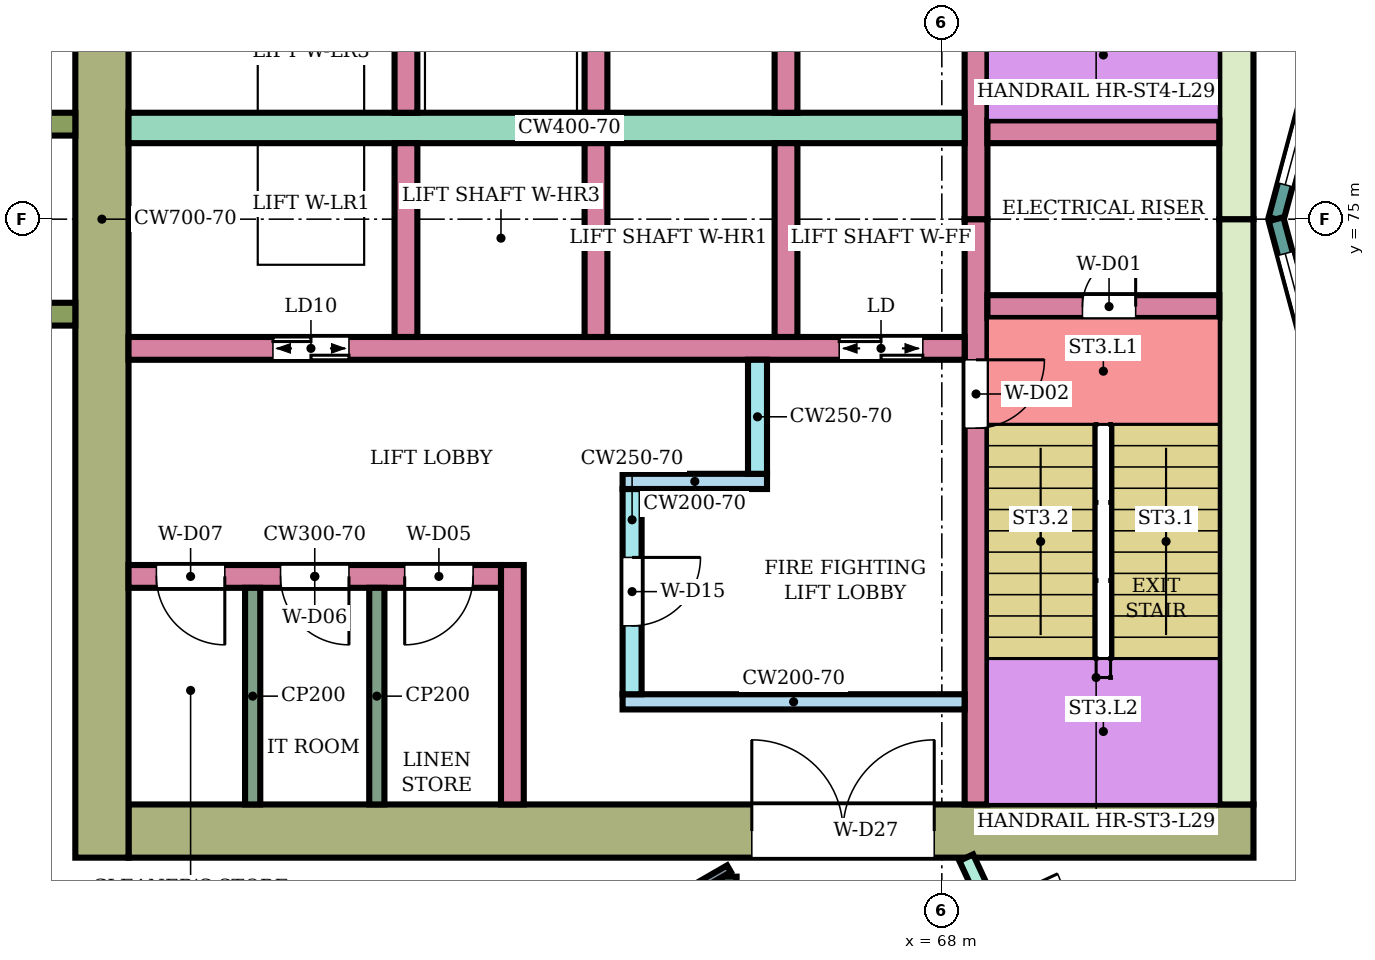
"""IFC4 building model, lengths in metres.
Left out: names, types, materials, properties, quantities, classifications, styles, units other than length and angle.
Written with IfcOpenShell. Run it as: python <this file> out.ifc"""

import sys

from ifc_helpers import new_model, si_unit, direction, frame, frame_2d, origin, place, context, subcontext, project, spatial, rectangle, extrude, element, fill, save


model = new_model("IFC4")
c1 = context("Model", 3, precision=1e-05, world=origin(), true_north=direction((0.0, 1.0)))
c2 = subcontext(c1, "Body", "Model", "MODEL_VIEW")
j1 = project(units=[si_unit("LENGTHUNIT", "METRE"), si_unit("PLANEANGLEUNIT", "RADIAN")], contexts=[c1])
p1 = place(None, origin())
s1 = spatial("IfcSite", under=j1, at=p1, CompositionType="ELEMENT")
p2 = place(p1, origin())
s2 = spatial("IfcBuilding", under=s1, at=p2, CompositionType="ELEMENT")
p3 = place(p2, frame((0.0, 0.0, 126.3)))
s3 = spatial("IfcBuildingStorey", under=s2, at=p3, CompositionType="ELEMENT", Elevation=126.3)
p4 = place(p3, frame((72.1, 66.95, 0.0), z_axis=(0.0, 0.0, 1.0), x_axis=(-1.0, 0.0, 0.0)))
e1 = element("IfcWall", 1, at=p4, inside=s3, PredefinedType="SHEAR", context=c2, shape_type="SweptSolid", body=[
    extrude(rectangle(XDim=14.8, YDim=0.7, at=frame_2d((7.4, 0.0))), origin(), (0.0, 0.0, 1.0), 3.58),
])
p5 = place(p4, frame((4.2, 0.0, 0.0)))
e2 = element("IfcOpeningElement", 2, at=p5, cuts=e1, PredefinedType="OPENING", context=c2, shape_type="SweptSolid", body=[
    extrude(rectangle(XDim=2.4, YDim=2.4, at=frame_2d((1.2, 1.2))), frame((0.0, 0.36, 0.0), z_axis=(0.0, -1.0, 0.0), x_axis=(1.0, 0.0, 0.0)), (0.0, 0.0, 1.0), 0.72),
])
for number, where, z_axis, x_axis in (
    (3, (71.875, 75.0, 0.0), (0.0, 0.0, 1.0), (0.0, -1.0, 0.0)),
    (4, (71.875, 82.7, 0.0), (0.0, 0.0, 1.0), (0.0, -1.0, 0.0)),
):
    element("IfcWall", number, at=place(p3, frame(where, z_axis=z_axis, x_axis=x_axis)), inside=s3, PredefinedType="SHEAR", context=c2, shape_type="SweptSolid", body=[
        extrude(rectangle(XDim=7.7, YDim=0.45, at=frame_2d((3.85, 0.0))), origin(), (0.0, 0.0, 1.0), 3.58),
    ])
p6 = place(p3, frame((56.95, 83.4, 0.0), z_axis=(0.0, 0.0, 1.0), x_axis=(0.0, -1.0, 0.0)))
e5 = element("IfcWall", 5, at=p6, inside=s3, PredefinedType="SHEAR", context=c2, shape_type="SweptSolid", body=[
    extrude(rectangle(XDim=16.8, YDim=0.7, at=frame_2d((8.4, 0.0))), origin(), (0.0, 0.0, 1.0), 3.58),
])
p7 = place(p3, frame((68.45, 75.0, 0.0), z_axis=(0.0, 0.0, 1.0), x_axis=(0.0, -1.0, 0.0)))
e6 = element("IfcWall", 6, at=p7, inside=s3, PredefinedType="SHEAR", context=c2, shape_type="SweptSolid", body=[
    extrude(rectangle(XDim=7.7, YDim=0.3, at=frame_2d((3.85, 0.0))), origin(), (0.0, 0.0, 1.0), 3.58),
])
p8 = place(p7, frame((1.85, 0.0, 0.0)))
e7 = element("IfcOpeningElement", 7, at=p8, cuts=e6, PredefinedType="OPENING", context=c2, shape_type="SweptSolid", body=[
    extrude(rectangle(XDim=0.9, YDim=2.1, at=frame_2d((0.45, 1.05))), frame((0.0, 0.16, 0.0), z_axis=(0.0, -1.0, 0.0), x_axis=(1.0, 0.0, 0.0)), (0.0, 0.0, 1.0), 0.32),
])
p9 = place(p3, frame((68.45, 82.7, 0.0), z_axis=(0.0, 0.0, 1.0), x_axis=(0.0, -1.0, 0.0)))
e8 = element("IfcWall", 8, at=p9, inside=s3, PredefinedType="SHEAR", context=c2, shape_type="SweptSolid", body=[
    extrude(rectangle(XDim=7.7, YDim=0.3, at=frame_2d((3.85, 0.0))), origin(), (0.0, 0.0, 1.0), 3.58),
])
p10 = place(p9, frame((0.35, 0.0, 0.0)))
e9 = element("IfcOpeningElement", 9, at=p10, cuts=e8, PredefinedType="OPENING", context=c2, shape_type="SweptSolid", body=[
    extrude(rectangle(XDim=0.9, YDim=2.1, at=frame_2d((0.45, 1.05))), frame((0.0, 0.16, 0.0), z_axis=(0.0, -1.0, 0.0), x_axis=(1.0, 0.0, 0.0)), (0.0, 0.0, 1.0), 0.32),
])
p11 = place(p3, frame((71.65, 73.85, 0.0), z_axis=(0.0, 0.0, 1.0), x_axis=(-1.0, 0.0, 0.0)))
e10 = element("IfcWall", 10, at=p11, inside=s3, PredefinedType="SHEAR", context=c2, shape_type="SweptSolid", body=[
    extrude(rectangle(XDim=3.05, YDim=0.3, at=frame_2d((1.525, 0.0))), origin(), (0.0, 0.0, 1.0), 3.58),
])
p12 = place(p11, frame((1.1, 0.0, 0.0)))
e11 = element("IfcOpeningElement", 11, at=p12, cuts=e10, PredefinedType="OPENING", context=c2, shape_type="SweptSolid", body=[
    extrude(rectangle(XDim=0.7, YDim=2.0, at=frame_2d((0.35, 1.0))), frame((0.0, 0.16, 0.0), z_axis=(0.0, -1.0, 0.0), x_axis=(1.0, 0.0, 0.0)), (0.0, 0.0, 1.0), 0.32),
])
p13 = place(p3, frame((71.65, 76.15, 0.0), z_axis=(0.0, 0.0, 1.0), x_axis=(-1.0, 0.0, 0.0)))
e12 = element("IfcWall", 12, at=p13, inside=s3, PredefinedType="SHEAR", context=c2, shape_type="SweptSolid", body=[
    extrude(rectangle(XDim=3.05, YDim=0.3, at=frame_2d((1.525, 0.0))), origin(), (0.0, 0.0, 1.0), 3.58),
])
p14 = place(p3, frame((68.3, 73.3, 0.0), z_axis=(0.0, 0.0, 1.0), x_axis=(-1.0, 0.0, 0.0)))
e13 = element("IfcWall", 13, at=p14, inside=s3, PredefinedType="SHEAR", context=c2, shape_type="SweptSolid", body=[
    extrude(rectangle(XDim=11.0, YDim=0.3, at=frame_2d((5.5, 0.0))), origin(), (0.0, 0.0, 1.0), 3.58),
])
p15 = place(p14, frame((0.55, 0.0, 0.0)))
e14 = element("IfcOpeningElement", 14, at=p15, cuts=e13, PredefinedType="OPENING", context=c2, shape_type="SweptSolid", body=[
    extrude(rectangle(XDim=1.1, YDim=2.1, at=frame_2d((0.55, 1.05))), frame((0.0, 0.16, 0.0), z_axis=(0.0, -1.0, 0.0), x_axis=(1.0, 0.0, 0.0)), (0.0, 0.0, 1.0), 0.32),
])
p16 = place(p14, frame((8.1, 0.0, 0.0)))
e15 = element("IfcOpeningElement", 15, at=p16, cuts=e13, PredefinedType="OPENING", context=c2, shape_type="SweptSolid", body=[
    extrude(rectangle(XDim=1.0, YDim=2.1, at=frame_2d((0.5, 1.05))), frame((0.0, 0.16, 0.0), z_axis=(0.0, -1.0, 0.0), x_axis=(1.0, 0.0, 0.0)), (0.0, 0.0, 1.0), 0.32),
])
p17 = place(p3, frame((68.3, 76.2, 0.0), z_axis=(0.0, 0.0, 1.0), x_axis=(-1.0, 0.0, 0.0)))
e16 = element("IfcWall", 16, at=p17, inside=s3, PredefinedType="SHEAR", context=c2, shape_type="SweptSolid", body=[
    extrude(rectangle(XDim=11.0, YDim=0.4, at=frame_2d((5.5, 0.0))), origin(), (0.0, 0.0, 1.0), 3.58),
])
for number, where, z_axis, x_axis in (
    (17, (65.95, 76.0, 0.0), (0.0, 0.0, 1.0), (0.0, -1.0, 0.0)),
    (18, (63.45, 76.0, 0.0), (0.0, 0.0, 1.0), (0.0, -1.0, 0.0)),
    (19, (60.95, 76.0, 0.0), (0.0, 0.0, 1.0), (0.0, -1.0, 0.0)),
    (20, (65.95, 78.95, 0.0), (0.0, 0.0, 1.0), (0.0, -1.0, 0.0)),
    (21, (63.45, 78.95, 0.0), (0.0, 0.0, 1.0), (0.0, -1.0, 0.0)),
    (22, (60.95, 78.95, 0.0), (0.0, 0.0, 1.0), (0.0, -1.0, 0.0)),
):
    element("IfcWall", number, at=place(p3, frame(where, z_axis=z_axis, x_axis=x_axis)), inside=s3, PredefinedType="SHEAR", context=c2, shape_type="SweptSolid", body=[
        extrude(rectangle(XDim=2.55, YDim=0.3, at=frame_2d((1.275, 0.0))), origin(), (0.0, 0.0, 1.0), 3.58),
    ])
p18 = place(p3, frame((68.3, 68.65, 0.0), z_axis=(0.0, 0.0, 1.0), x_axis=(-1.0, 0.0, 0.0)))
e23 = element("IfcWall", 23, at=p18, inside=s3, PredefinedType="SHEAR", context=c2, shape_type="SweptSolid", body=[
    extrude(rectangle(XDim=4.5, YDim=0.2, at=frame_2d((2.25, 0.0))), origin(), (0.0, 0.0, 1.0), 3.58),
])
p19 = place(p3, frame((63.925, 71.45, 0.0), z_axis=(0.0, 0.0, 1.0), x_axis=(0.0, -1.0, 0.0)))
e24 = element("IfcWall", 24, at=p19, inside=s3, PredefinedType="SHEAR", context=c2, shape_type="SweptSolid", body=[
    extrude(rectangle(XDim=2.7, YDim=0.25, at=frame_2d((1.35, 0.0))), origin(), (0.0, 0.0, 1.0), 3.58),
])
p20 = place(p19, frame((0.9, 0.0, 0.0)))
e25 = element("IfcOpeningElement", 25, at=p20, cuts=e24, PredefinedType="OPENING", context=c2, shape_type="SweptSolid", body=[
    extrude(rectangle(XDim=0.9, YDim=2.1, at=frame_2d((0.45, 1.05))), frame((0.0, 0.135, 0.0), z_axis=(0.0, -1.0, 0.0), x_axis=(1.0, 0.0, 0.0)), (0.0, 0.0, 1.0), 0.27),
])
p21 = place(p3, frame((65.7, 71.55, 0.0), z_axis=(0.0, 0.0, 1.0), x_axis=(-1.0, 0.0, 0.0)))
e26 = element("IfcWall", 26, at=p21, inside=s3, PredefinedType="SHEAR", context=c2, shape_type="SweptSolid", body=[
    extrude(rectangle(XDim=1.9, YDim=0.2, at=frame_2d((0.95, 0.0))), origin(), (0.0, 0.0, 1.0), 3.58),
])
p22 = place(p3, frame((65.575, 73.15, 0.0), z_axis=(0.0, 0.0, 1.0), x_axis=(0.0, -1.0, 0.0)))
e27 = element("IfcWall", 27, at=p22, inside=s3, PredefinedType="SHEAR", context=c2, shape_type="SweptSolid", body=[
    extrude(rectangle(XDim=1.5, YDim=0.25, at=frame_2d((0.75, 0.0))), origin(), (0.0, 0.0, 1.0), 3.58),
])
p23 = place(p3, frame((62.35, 70.45, 0.0), z_axis=(0.0, 0.0, 1.0), x_axis=(0.0, -1.0, 0.0)))
e28 = element("IfcWall", 28, at=p23, inside=s3, PredefinedType="SHEAR", context=c2, shape_type="SweptSolid", body=[
    extrude(rectangle(XDim=3.15, YDim=0.3, at=frame_2d((1.575, 0.0))), origin(), (0.0, 0.0, 1.0), 3.58),
])
p24 = place(p3, frame((62.2, 70.3, 0.0), z_axis=(0.0, 0.0, 1.0), x_axis=(-1.0, 0.0, 0.0)))
e29 = element("IfcWall", 29, at=p24, inside=s3, PredefinedType="SHEAR", context=c2, shape_type="SweptSolid", body=[
    extrude(rectangle(XDim=4.9, YDim=0.3, at=frame_2d((2.45, 0.0))), origin(), (0.0, 0.0, 1.0), 3.58),
])
p25 = place(p24, frame((0.367, 0.0, 0.0)))
e30 = element("IfcOpeningElement", 30, at=p25, cuts=e29, PredefinedType="OPENING", context=c2, shape_type="SweptSolid", body=[
    extrude(rectangle(XDim=0.9, YDim=2.1, at=frame_2d((0.45, 1.05))), frame((0.0, 0.16, 0.0), z_axis=(0.0, -1.0, 0.0), x_axis=(1.0, 0.0, 0.0)), (0.0, 0.0, 1.0), 0.32),
])
p26 = place(p24, frame((2.0, 0.0, 0.0)))
e31 = element("IfcOpeningElement", 31, at=p26, cuts=e29, PredefinedType="OPENING", context=c2, shape_type="SweptSolid", body=[
    extrude(rectangle(XDim=0.9, YDim=2.1, at=frame_2d((0.45, 1.05))), frame((0.0, 0.16, 0.0), z_axis=(0.0, -1.0, 0.0), x_axis=(1.0, 0.0, 0.0)), (0.0, 0.0, 1.0), 0.32),
])
p27 = place(p24, frame((3.633, 0.0, 0.0)))
e32 = element("IfcOpeningElement", 32, at=p27, cuts=e29, PredefinedType="OPENING", context=c2, shape_type="SweptSolid", body=[
    extrude(rectangle(XDim=0.9, YDim=2.1, at=frame_2d((0.45, 1.05))), frame((0.0, 0.16, 0.0), z_axis=(0.0, -1.0, 0.0), x_axis=(1.0, 0.0, 0.0)), (0.0, 0.0, 1.0), 0.32),
])
for number, where, z_axis, x_axis in (
    (33, (56.6, 76.25, 0.0), (0.0, 0.0, 1.0), (-1.0, 0.0, 0.0)),
    (34, (56.6, 73.75, 0.0), (0.0, 0.0, 1.0), (-1.0, 0.0, 0.0)),
):
    element("IfcWall", number, at=place(p3, frame(where, z_axis=z_axis, x_axis=x_axis)), inside=s3, PredefinedType="NOTDEFINED", context=c2, shape_type="SweptSolid", body=[
        extrude(rectangle(XDim=2.416, YDim=0.3, at=frame_2d((1.208, 0.0))), origin(), (0.0, 0.0, 1.0), 3.9),
    ])
p28 = place(p3, frame((73.415, 78.802, 0.0), z_axis=(0.0, 0.0, 1.0), x_axis=(-0.258789828301, -0.965933654434, 0.0)))
e35 = element("IfcWall", 35, at=p28, inside=s3, PredefinedType="NOTDEFINED", context=c2, shape_type="SweptSolid", body=[
    extrude(rectangle(XDim=3.936, YDim=0.2, at=frame_2d((1.968, 0.0))), origin(), (0.0, 0.0, 1.0), 3.9),
])
p29 = place(p28, frame((0.468, 0.0, 0.9)))
e36 = element("IfcOpeningElement", 36, at=p29, cuts=e35, PredefinedType="OPENING", context=c2, shape_type="SweptSolid", body=[
    extrude(rectangle(XDim=3.0, YDim=2.3, at=frame_2d((1.5, 1.15))), frame((0.0, 0.11, 0.0), z_axis=(0.0, -1.0, 0.0), x_axis=(1.0, 0.0, 0.0)), (0.0, 0.0, 1.0), 0.22),
])
p30 = place(p3, frame((72.396, 75.0, 0.0), z_axis=(0.0, 0.0, 1.0), x_axis=(0.258789828301, -0.965933654434, 0.0)))
e37 = element("IfcWall", 37, at=p30, inside=s3, PredefinedType="NOTDEFINED", context=c2, shape_type="SweptSolid", body=[
    extrude(rectangle(XDim=3.936, YDim=0.2, at=frame_2d((1.968, 0.0))), origin(), (0.0, 0.0, 1.0), 3.9),
])
p31 = place(p30, frame((0.468, 0.0, 0.9)))
e38 = element("IfcOpeningElement", 38, at=p31, cuts=e37, PredefinedType="OPENING", context=c2, shape_type="SweptSolid", body=[
    extrude(rectangle(XDim=3.0, YDim=2.3, at=frame_2d((1.5, 1.15))), frame((0.0, 0.11, 0.0), z_axis=(0.0, -1.0, 0.0), x_axis=(1.0, 0.0, 0.0)), (0.0, 0.0, 1.0), 0.22),
])
p32 = place(p3, frame((65.2, 65.2, 0.0), z_axis=(0.0, 0.0, 1.0), x_axis=(0.0, 1.0, 0.0)))
e39 = element("IfcWall", 39, at=p32, inside=s3, PredefinedType="PARTITIONING", context=c2, shape_type="SweptSolid", body=[
    extrude(rectangle(XDim=1.15, YDim=0.2, at=frame_2d((0.575, 0.0))), origin(), (0.0, 0.0, 1.0), 3.45),
])
p33 = place(p32, frame((0.087, 0.0, 0.0)))
e40 = element("IfcOpeningElement", 40, at=p33, cuts=e39, PredefinedType="OPENING", context=c2, shape_type="SweptSolid", body=[
    extrude(rectangle(XDim=1.0, YDim=2.1, at=frame_2d((0.5, 1.05))), frame((0.0, 0.11, 0.0), z_axis=(0.0, -1.0, 0.0), x_axis=(1.0, 0.0, 0.0)), (0.0, 0.0, 1.0), 0.22),
])
p34 = place(p3, frame((68.321, 66.6, 0.0), z_axis=(0.0, 0.0, 1.0), x_axis=(0.421914092414, -0.906635813666, 0.0)))
e41 = element("IfcWall", 41, at=p34, inside=s3, PredefinedType="PARTITIONING", context=c2, shape_type="SweptSolid", body=[
    extrude(rectangle(XDim=7.459, YDim=0.2, at=frame_2d((3.73, 0.0))), origin(), (0.0, 0.0, 1.0), 3.45),
])
p35 = place(p34, frame((0.7, 0.0, 0.0)))
e42 = element("IfcOpeningElement", 42, at=p35, cuts=e41, PredefinedType="OPENING", context=c2, shape_type="SweptSolid", body=[
    extrude(rectangle(XDim=1.0, YDim=2.1, at=frame_2d((0.5, 1.05))), frame((0.0, 0.11, 0.0), z_axis=(0.0, -1.0, 0.0), x_axis=(1.0, 0.0, 0.0)), (0.0, 0.0, 1.0), 0.22),
])
p36 = place(p3, frame((71.462, 60.217, 0.0), z_axis=(0.0, 0.0, 1.0), x_axis=(0.500094460186, 0.865970860302, 0.0)))
e43 = element("IfcWall", 43, at=p36, inside=s3, PredefinedType="PARTITIONING", context=c2, shape_type="SweptSolid", body=[
    extrude(rectangle(XDim=9.373, YDim=0.2, at=frame_2d((4.687, 0.0))), origin(), (0.0, 0.0, 1.0), 3.45),
])
p37 = place(p3, frame((57.659, 62.101, 0.0), z_axis=(0.0, 0.0, 1.0), x_axis=(0.86602264145, 0.500004784474, 0.0)))
e44 = element("IfcWall", 44, at=p37, inside=s3, PredefinedType="PARTITIONING", context=c2, shape_type="SweptSolid", body=[
    extrude(rectangle(XDim=8.708, YDim=0.1, at=frame_2d((4.354, 0.0))), origin(), (0.0, 0.0, 1.0), 3.45),
])
p38 = place(p37, frame((3.929, 0.0, 0.0)))
e45 = element("IfcOpeningElement", 45, at=p38, cuts=e44, PredefinedType="OPENING", context=c2, shape_type="SweptSolid", body=[
    extrude(rectangle(XDim=0.9, YDim=2.1, at=frame_2d((0.45, 1.05))), frame((0.0, 0.06, 0.0), z_axis=(0.0, -1.0, 0.0), x_axis=(1.0, 0.0, 0.0)), (0.0, 0.0, 1.0), 0.12),
])
for number, where, z_axis, x_axis in (
    (46, (60.567, 70.15, 0.0), (0.0, 0.0, 1.0), (0.0, -1.0, 0.0)),
    (47, (58.933, 70.15, 0.0), (0.0, 0.0, 1.0), (0.0, -1.0, 0.0)),
):
    element("IfcWall", number, at=place(p3, frame(where, z_axis=z_axis, x_axis=x_axis)), inside=s3, PredefinedType="PARTITIONING", context=c2, shape_type="SweptSolid", body=[
        extrude(rectangle(XDim=2.85, YDim=0.2, at=frame_2d((1.425, 0.0))), origin(), (0.0, 0.0, 1.0), 3.58),
    ])
p39 = place(p29, origin())
e48 = element("IfcWindow", 48, at=p39, inside=s3, PartitioningType="SINGLE_PANEL", PredefinedType="WINDOW", context=c2, shape_type="SweptSolid", body=[
    extrude(rectangle(XDim=3.0, YDim=2.3, at=frame_2d((1.5, 1.15))), frame((0.0, 0.03, 0.0), z_axis=(0.0, -1.0, 0.0), x_axis=(1.0, 0.0, 0.0)), (0.0, 0.0, 1.0), 0.06),
])
fill(e36, e48)
p40 = place(p31, origin())
e49 = element("IfcWindow", 49, at=p40, inside=s3, PartitioningType="SINGLE_PANEL", PredefinedType="WINDOW", context=c2, shape_type="SweptSolid", body=[
    extrude(rectangle(XDim=3.0, YDim=2.3, at=frame_2d((1.5, 1.15))), frame((0.0, 0.03, 0.0), z_axis=(0.0, -1.0, 0.0), x_axis=(1.0, 0.0, 0.0)), (0.0, 0.0, 1.0), 0.06),
])
fill(e38, e49)
p41 = place(p12, frame((0.7, 0.0, 0.0), z_axis=(0.0, 0.0, 1.0), x_axis=(-1.0, 0.0, 0.0)))
e50 = element("IfcDoor", 50, at=p41, inside=s3, OperationType="SINGLE_SWING_RIGHT", PredefinedType="DOOR", context=c2, shape_type="SweptSolid", body=[
    extrude(rectangle(XDim=0.7, YDim=2.0, at=frame_2d((0.35, 1.0))), frame((0.0, 0.025, 0.0), z_axis=(0.0, -1.0, 0.0), x_axis=(1.0, 0.0, 0.0)), (0.0, 0.0, 1.0), 0.05),
])
fill(e11, e50)
p42 = place(p8, origin())
e51 = element("IfcDoor", 51, at=p42, inside=s3, OperationType="SINGLE_SWING_LEFT", PredefinedType="DOOR", context=c2, shape_type="SweptSolid", body=[
    extrude(rectangle(XDim=0.9, YDim=2.1, at=frame_2d((0.45, 1.05))), frame((0.0, 0.025, 0.0), z_axis=(0.0, -1.0, 0.0), x_axis=(1.0, 0.0, 0.0)), (0.0, 0.0, 1.0), 0.05),
])
fill(e7, e51)
p43 = place(p15, origin())
e52 = element("IfcDoor", 52, at=p43, inside=s3, OperationType="DOUBLE_DOOR_SLIDING", PredefinedType="DOOR", context=c2, shape_type="SweptSolid", body=[
    extrude(rectangle(XDim=1.1, YDim=2.1, at=frame_2d((0.55, 1.05))), frame((0.0, 0.025, 0.0), z_axis=(0.0, -1.0, 0.0), x_axis=(1.0, 0.0, 0.0)), (0.0, 0.0, 1.0), 0.05),
])
fill(e14, e52)
p44 = place(p16, origin())
e53 = element("IfcDoor", 53, at=p44, inside=s3, OperationType="DOUBLE_DOOR_SLIDING", PredefinedType="DOOR", context=c2, shape_type="SweptSolid", body=[
    extrude(rectangle(XDim=1.0, YDim=2.1, at=frame_2d((0.5, 1.05))), frame((0.0, 0.025, 0.0), z_axis=(0.0, -1.0, 0.0), x_axis=(1.0, 0.0, 0.0)), (0.0, 0.0, 1.0), 0.05),
])
fill(e15, e53)
p45 = place(p20, origin())
e54 = element("IfcDoor", 54, at=p45, inside=s3, OperationType="SINGLE_SWING_LEFT", PredefinedType="DOOR", context=c2, shape_type="SweptSolid", body=[
    extrude(rectangle(XDim=0.9, YDim=2.1, at=frame_2d((0.45, 1.05))), frame((0.0, 0.025, 0.0), z_axis=(0.0, -1.0, 0.0), x_axis=(1.0, 0.0, 0.0)), (0.0, 0.0, 1.0), 0.05),
])
fill(e25, e54)
p46 = place(p25, origin())
e55 = element("IfcDoor", 55, at=p46, inside=s3, OperationType="SINGLE_SWING_RIGHT", PredefinedType="DOOR", context=c2, shape_type="SweptSolid", body=[
    extrude(rectangle(XDim=0.9, YDim=2.1, at=frame_2d((0.45, 1.05))), frame((0.0, 0.025, 0.0), z_axis=(0.0, -1.0, 0.0), x_axis=(1.0, 0.0, 0.0)), (0.0, 0.0, 1.0), 0.05),
])
fill(e30, e55)
p47 = place(p26, origin())
e56 = element("IfcDoor", 56, at=p47, inside=s3, OperationType="SINGLE_SWING_LEFT", PredefinedType="DOOR", context=c2, shape_type="SweptSolid", body=[
    extrude(rectangle(XDim=0.9, YDim=2.1, at=frame_2d((0.45, 1.05))), frame((0.0, 0.025, 0.0), z_axis=(0.0, -1.0, 0.0), x_axis=(1.0, 0.0, 0.0)), (0.0, 0.0, 1.0), 0.05),
])
fill(e31, e56)
p48 = place(p27, origin())
e57 = element("IfcDoor", 57, at=p48, inside=s3, OperationType="SINGLE_SWING_LEFT", PredefinedType="DOOR", context=c2, shape_type="SweptSolid", body=[
    extrude(rectangle(XDim=0.9, YDim=2.1, at=frame_2d((0.45, 1.05))), frame((0.0, 0.025, 0.0), z_axis=(0.0, -1.0, 0.0), x_axis=(1.0, 0.0, 0.0)), (0.0, 0.0, 1.0), 0.05),
])
fill(e32, e57)
p49 = place(p5, frame((2.4, 0.0, 0.0), z_axis=(0.0, 0.0, 1.0), x_axis=(-1.0, 0.0, 0.0)))
e58 = element("IfcDoor", 58, at=p49, inside=s3, OperationType="DOUBLE_DOOR_SINGLE_SWING", PredefinedType="DOOR", context=c2, shape_type="SweptSolid", body=[
    extrude(rectangle(XDim=2.4, YDim=2.4, at=frame_2d((1.2, 1.2))), frame((0.0, 0.025, 0.0), z_axis=(0.0, -1.0, 0.0), x_axis=(1.0, 0.0, 0.0)), (0.0, 0.0, 1.0), 0.05),
])
fill(e2, e58)
save(model, sys.argv[1])
